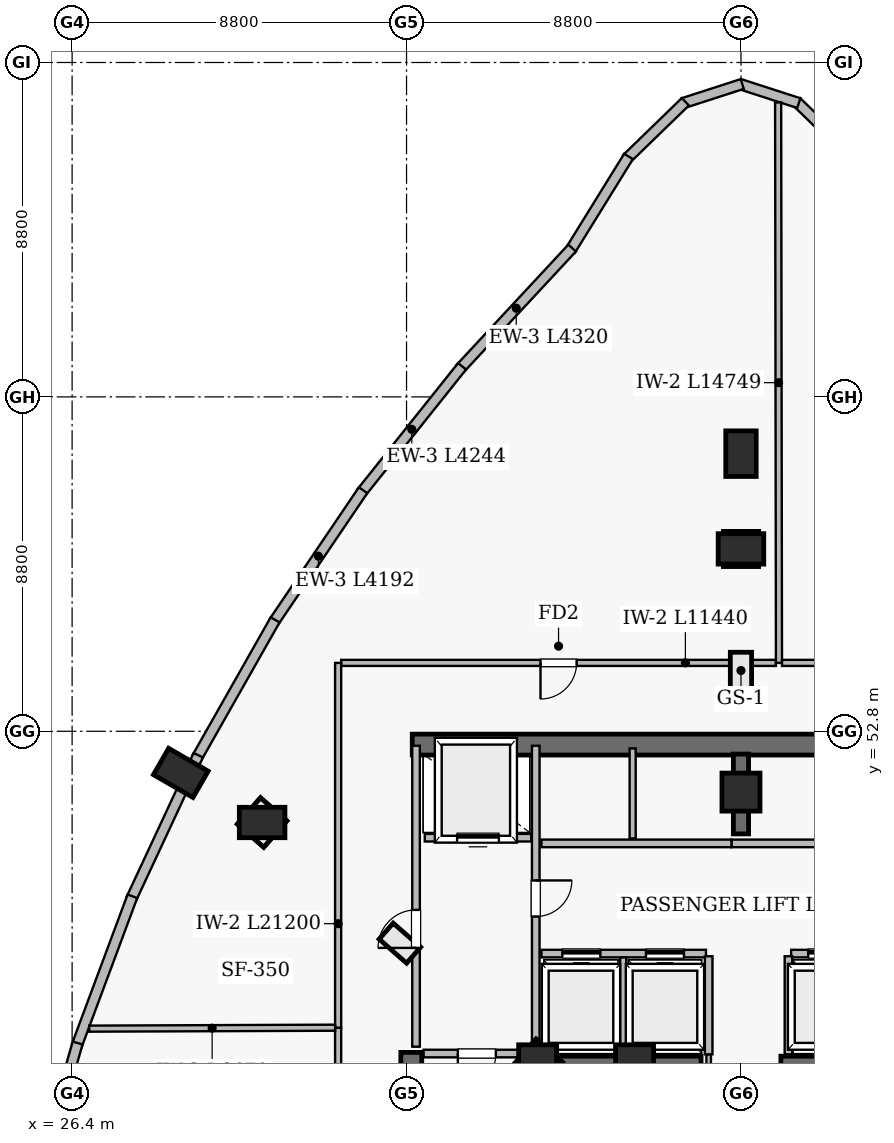
"""IFC4 building model, lengths in metres.
Left out: names, types, materials, properties, quantities, classifications, styles, units other than length and angle.
Written with IfcOpenShell. Run it as: python <this file> out.ifc"""

import sys

from ifc_helpers import new_model, si_unit, direction, frame, frame_2d, origin, origin_2d, place, context, subcontext, project, spatial, rectangle, extrude, element, fill, save


model = new_model("IFC4")
c1 = context("Model", 3, precision=1e-05, world=origin(), true_north=direction((0.0, 1.0)))
c2 = subcontext(c1, "Body", "Model", "MODEL_VIEW")
j1 = project(units=[si_unit("LENGTHUNIT", "METRE"), si_unit("PLANEANGLEUNIT", "RADIAN")], contexts=[c1])
p1 = place(None, origin())
s1 = spatial("IfcSite", under=j1, at=p1, CompositionType="ELEMENT")
p2 = place(p1, origin())
s2 = spatial("IfcBuilding", under=s1, at=p2, CompositionType="ELEMENT")
p3 = place(p2, frame((0.0, 0.0, 184.4)))
s3 = spatial("IfcBuildingStorey", under=s2, at=p3, CompositionType="ELEMENT", Elevation=184.4)
p4 = place(p3, frame((35.35, 52.45, 0.0), z_axis=(0.0, 0.0, 1.0), x_axis=(1.0, 0.0, 0.0)))
e1 = element("IfcWall", 1, at=p4, inside=s3, PredefinedType="SHEAR", context=c2, shape_type="SweptSolid", body=[
    extrude(rectangle(XDim=17.3, YDim=0.55, at=frame_2d((8.65, 0.0))), origin(), (0.0, 0.0, 1.0), 5.1),
])
p5 = place(p3, frame((35.325, 35.05, 0.0), z_axis=(0.0, 0.0, 1.0), x_axis=(0.0, 1.0, 0.0)))
e2 = element("IfcWall", 2, at=p5, inside=s3, PredefinedType="SHEAR", context=c2, shape_type="SweptSolid", body=[
    extrude(rectangle(XDim=9.3, YDim=0.55, at=frame_2d((4.65, 0.0))), origin(), (0.0, 0.0, 1.0), 5.1),
])
p6 = place(p3, frame((38.725, 35.4, 0.0), z_axis=(0.0, 0.0, 1.0), x_axis=(0.0, 1.0, 0.0)))
e3 = element("IfcWall", 3, at=p6, inside=s3, PredefinedType="SHEAR", context=c2, shape_type="SweptSolid", body=[
    extrude(rectangle(XDim=8.95, YDim=0.55, at=frame_2d((4.475, 0.0))), origin(), (0.0, 0.0, 1.0), 5.1),
])
p7 = place(p3, frame((44.0, 50.1, 0.0), z_axis=(0.0, 0.0, 1.0), x_axis=(0.0, 1.0, 0.0)))
e4 = element("IfcWall", 4, at=p7, inside=s3, PredefinedType="SHEAR", context=c2, shape_type="SweptSolid", body=[
    extrude(rectangle(XDim=2.1, YDim=0.4, at=frame_2d((1.05, 0.0))), origin(), (0.0, 0.0, 1.0), 5.1),
])
for number, where, z_axis, x_axis in (
    (5, (38.75, 44.05, 0.0), (0.0, 0.0, 1.0), (1.0, 0.0, 0.0)),
    (6, (45.05, 44.05, 0.0), (0.0, 0.0, 1.0), (1.0, 0.0, 0.0)),
):
    element("IfcWall", number, at=place(p3, frame(where, z_axis=z_axis, x_axis=x_axis)), inside=s3, PredefinedType="SHEAR", context=c2, shape_type="SweptSolid", body=[
        extrude(rectangle(XDim=4.2, YDim=0.4, at=frame_2d((2.1, 0.0))), origin(), (0.0, 0.0, 1.0), 5.1),
    ])
for number, where, z_axis, x_axis in (
    (7, (38.65, 44.05, 0.0), (0.0, 0.0, 1.0), (1.0, 0.0, 0.0)),
    (8, (44.0, 51.2, 0.0), (0.0, 0.0, 1.0), (1.0, 0.0, 0.0)),
    (9, (41.2, 44.05, 0.0), (0.0, 0.0, 1.0), (1.0, 0.0, 0.0)),
):
    element("IfcColumn", number, at=place(p3, frame(where, z_axis=z_axis, x_axis=x_axis)), inside=s3, PredefinedType="COLUMN", context=c2, shape_type="SweptSolid", body=[
        extrude(rectangle(XDim=1.0, YDim=1.0, at=origin_2d()), origin(), (0.0, 0.0, 1.0), 5.4),
    ])
for number, where, z_axis, x_axis in (
    (10, (44.0, 57.6, 0.0), (0.0, 0.0, 1.0), (1.0, 0.0, 0.0)),
    (11, (31.4, 50.4, 0.0), (0.0, 0.0, 1.0), (1.0, 0.0, 0.0)),
    (12, (44.0, 60.106, 0.0), (0.0, 0.0, 1.0), (0.0, 1.0, 0.0)),
    (13, (29.26, 51.705, 0.0), (0.0, 0.0, 1.0), (-0.866, 0.5, 0.0)),
):
    element("IfcColumn", number, at=place(p3, frame(where, z_axis=z_axis, x_axis=x_axis)), inside=s3, PredefinedType="COLUMN", context=c2, shape_type="SweptSolid", body=[
        extrude(rectangle(XDim=1.2, YDim=0.8, at=origin_2d()), origin(), (0.0, 0.0, 1.0), 5.4),
    ])
p8 = place(p3, frame((47.003, 67.873, 0.0), z_axis=(0.0, 0.0, 1.0), x_axis=(-0.717784851278, 0.696264969157, 0.0)))
e14 = element("IfcWall", 14, at=p8, inside=s3, PredefinedType="SOLIDWALL", context=c2, shape_type="SweptSolid", body=[
    extrude(rectangle(XDim=2.144, YDim=0.27, at=frame_2d((1.072, 0.0))), origin(), (0.0, 0.0, 1.0), 5.1),
])
for number, where, z_axis, x_axis in (
    (15, (45.522, 69.331, 0.0), (0.0, 0.0, 1.0), (-0.951, 0.308, 0.0)),
    (16, (44.033, 69.834, 0.0), (0.0, 0.0, 1.0), (-0.951, -0.308, 0.0)),
):
    element("IfcWall", number, at=place(p3, frame(where, z_axis=z_axis, x_axis=x_axis)), inside=s3, PredefinedType="SOLIDWALL", context=c2, shape_type="SweptSolid", body=[
        extrude(rectangle(XDim=1.635, YDim=0.27, at=frame_2d((0.817, 0.0))), origin(), (0.0, 0.0, 1.0), 5.1),
    ])
p9 = place(p3, frame((42.536, 69.366, 0.0), z_axis=(0.0, 0.0, 1.0), x_axis=(-0.717784851278, -0.696264969157, 0.0)))
e17 = element("IfcWall", 17, at=p9, inside=s3, PredefinedType="SOLIDWALL", context=c2, shape_type="SweptSolid", body=[
    extrude(rectangle(XDim=2.144, YDim=0.27, at=frame_2d((1.072, 0.0))), origin(), (0.0, 0.0, 1.0), 5.1),
])
p10 = place(p3, frame((41.041, 67.927, 0.0), z_axis=(0.0, 0.0, 1.0), x_axis=(-0.526073462403, -0.850439129012, 0.0)))
e18 = element("IfcWall", 18, at=p10, inside=s3, PredefinedType="SOLIDWALL", context=c2, shape_type="SweptSolid", body=[
    extrude(rectangle(XDim=2.9, YDim=0.27, at=frame_2d((1.45, 0.0))), origin(), (0.0, 0.0, 1.0), 5.1),
])
p11 = place(p3, frame((39.557, 65.516, 0.0), z_axis=(0.0, 0.0, 1.0), x_axis=(-0.68089748503, -0.732378737321, 0.0)))
e19 = element("IfcWall", 19, at=p11, inside=s3, PredefinedType="SOLIDWALL", context=c2, shape_type="SweptSolid", body=[
    extrude(rectangle(XDim=4.32, YDim=0.27, at=frame_2d((2.16, 0.0))), origin(), (0.0, 0.0, 1.0), 5.1),
])
p12 = place(p3, frame((36.661, 62.405, 0.0), z_axis=(0.0, 0.0, 1.0), x_axis=(-0.623600005041, -0.781743585655, 0.0)))
e20 = element("IfcWall", 20, at=p12, inside=s3, PredefinedType="SOLIDWALL", context=c2, shape_type="SweptSolid", body=[
    extrude(rectangle(XDim=4.244, YDim=0.27, at=frame_2d((2.122, 0.0))), origin(), (0.0, 0.0, 1.0), 5.1),
])
p13 = place(p3, frame((34.056, 59.144, 0.0), z_axis=(0.0, 0.0, 1.0), x_axis=(-0.560853295684, -0.827915201406, 0.0)))
e21 = element("IfcWall", 21, at=p13, inside=s3, PredefinedType="SOLIDWALL", context=c2, shape_type="SweptSolid", body=[
    extrude(rectangle(XDim=4.192, YDim=0.27, at=frame_2d((2.096, 0.0))), origin(), (0.0, 0.0, 1.0), 5.1),
])
p14 = place(p3, frame((31.742, 55.732, 0.0), z_axis=(0.0, 0.0, 1.0), x_axis=(-0.49336591454, -0.869821863585, 0.0)))
e22 = element("IfcWall", 22, at=p14, inside=s3, PredefinedType="SOLIDWALL", context=c2, shape_type="SweptSolid", body=[
    extrude(rectangle(XDim=4.166, YDim=0.27, at=frame_2d((2.083, 0.0))), origin(), (0.0, 0.0, 1.0), 4.588),
])
p15 = place(p3, frame((29.719, 52.171, 0.0), z_axis=(0.0, 0.0, 1.0), x_axis=(-0.422336806268, -0.906438978681, 0.0)))
e23 = element("IfcWall", 23, at=p15, inside=s3, PredefinedType="SOLIDWALL", context=c2, shape_type="SweptSolid", body=[
    extrude(rectangle(XDim=4.166, YDim=0.27, at=frame_2d((2.083, 0.0))), origin(), (0.0, 0.0, 1.0), 4.588),
])
p16 = place(p3, frame((27.986, 48.459, 0.0), z_axis=(0.0, 0.0, 1.0), x_axis=(-0.349022784807, -0.937114238333, 0.0)))
e24 = element("IfcWall", 24, at=p16, inside=s3, PredefinedType="SOLIDWALL", context=c2, shape_type="SweptSolid", body=[
    extrude(rectangle(XDim=4.192, YDim=0.27, at=frame_2d((2.096, 0.0))), origin(), (0.0, 0.0, 1.0), 5.1),
])
p17 = place(p3, frame((26.545, 44.597, 0.0), z_axis=(0.0, 0.0, 1.0), x_axis=(-0.274964238992, -0.961454454083, 0.0)))
e25 = element("IfcWall", 25, at=p17, inside=s3, PredefinedType="SOLIDWALL", context=c2, shape_type="SweptSolid", body=[
    extrude(rectangle(XDim=4.244, YDim=0.27, at=frame_2d((2.122, 0.0))), origin(), (0.0, 0.0, 1.0), 5.1),
])
p18 = place(p3, frame((33.4, 45.0, 0.0), z_axis=(0.0, 0.0, 1.0), x_axis=(0.0, -1.0, 0.0)))
e26 = element("IfcWall", 26, at=p18, inside=s3, PredefinedType="SOLIDWALL", context=c2, shape_type="SweptSolid", body=[
    extrude(rectangle(XDim=11.6, YDim=0.16, at=frame_2d((5.8, 0.0))), origin(), (0.0, 0.0, 1.0), 4.188),
])
p19 = place(p18, frame((4.605, 0.0, 0.0)))
e27 = element("IfcOpeningElement", 27, at=p19, cuts=e26, PredefinedType="OPENING", context=c2, shape_type="SweptSolid", body=[
    extrude(rectangle(XDim=0.95, YDim=2.15, at=frame_2d((0.475, 1.075))), frame((0.0, 0.09, 0.0), z_axis=(0.0, -1.0, 0.0), x_axis=(1.0, 0.0, 0.0)), (0.0, 0.0, 1.0), 0.18),
])
p20 = place(p3, frame((44.92, 54.6, 0.0), z_axis=(0.0, 0.0, 1.0), x_axis=(-1.0, 0.0, 0.0)))
e28 = element("IfcWall", 28, at=p20, inside=s3, PredefinedType="SOLIDWALL", context=c2, shape_type="SweptSolid", body=[
    extrude(rectangle(XDim=11.44, YDim=0.16, at=frame_2d((5.72, 0.0))), origin(), (0.0, 0.0, 1.0), 4.188),
])
p21 = place(p20, frame((5.245, 0.0, 0.0)))
e29 = element("IfcOpeningElement", 29, at=p21, cuts=e28, PredefinedType="OPENING", context=c2, shape_type="SweptSolid", body=[
    extrude(rectangle(XDim=0.95, YDim=2.15, at=frame_2d((0.475, 1.075))), frame((0.0, 0.09, 0.0), z_axis=(0.0, -1.0, 0.0), x_axis=(1.0, 0.0, 0.0)), (0.0, 0.0, 1.0), 0.18),
])
p22 = place(p3, frame((43.15, 35.6, 0.0), z_axis=(0.0, 0.0, 1.0), x_axis=(0.0, 1.0, 0.0)))
e30 = element("IfcWall", 30, at=p22, inside=s3, PredefinedType="PARTITIONING", context=c2, shape_type="SweptSolid", body=[
    extrude(rectangle(XDim=8.7, YDim=0.12, at=frame_2d((4.35, 0.0))), origin(), (0.0, 0.0, 1.0), 5.1),
])
p23 = place(p22, frame((1.11, 0.0, 0.0)))
e31 = element("IfcOpeningElement", 31, at=p23, cuts=e30, PredefinedType="OPENING", context=c2, shape_type="SweptSolid", body=[
    extrude(rectangle(XDim=0.88, YDim=2.1, at=frame_2d((0.44, 1.05))), frame((0.0, 0.07, 0.0), z_axis=(0.0, -1.0, 0.0), x_axis=(1.0, 0.0, 0.0)), (0.0, 0.0, 1.0), 0.14),
])
p24 = place(p22, frame((5.35, 0.0, 0.0)))
e32 = element("IfcOpeningElement", 32, at=p24, cuts=e30, PredefinedType="OPENING", context=c2, shape_type="SweptSolid", body=[
    extrude(rectangle(XDim=0.9, YDim=2.1, at=frame_2d((0.45, 1.05))), frame((0.0, 0.07, 0.0), z_axis=(0.0, -1.0, 0.0), x_axis=(1.0, 0.0, 0.0)), (0.0, 0.0, 1.0), 0.14),
])
p25 = place(p3, frame((35.45, 44.5, 0.0), z_axis=(0.0, 0.0, 1.0), x_axis=(0.0, 1.0, 0.0)))
e33 = element("IfcWall", 33, at=p25, inside=s3, PredefinedType="SOLIDWALL", context=c2, shape_type="SweptSolid", body=[
    extrude(rectangle(XDim=7.92, YDim=0.2, at=frame_2d((3.96, 0.0))), origin(), (0.0, 0.0, 1.0), 5.1),
])
p26 = place(p25, frame((2.6, 0.0, 0.0)))
e34 = element("IfcOpeningElement", 34, at=p26, cuts=e33, PredefinedType="OPENING", context=c2, shape_type="SweptSolid", body=[
    extrude(rectangle(XDim=1.0, YDim=2.15, at=frame_2d((0.5, 1.075))), frame((0.0, 0.11, 0.0), z_axis=(0.0, -1.0, 0.0), x_axis=(1.0, 0.0, 0.0)), (0.0, 0.0, 1.0), 0.22),
])
p27 = place(p3, frame((38.6, 44.5, 0.0), z_axis=(0.0, 0.0, 1.0), x_axis=(0.0, 1.0, 0.0)))
e35 = element("IfcWall", 35, at=p27, inside=s3, PredefinedType="SOLIDWALL", context=c2, shape_type="SweptSolid", body=[
    extrude(rectangle(XDim=7.92, YDim=0.2, at=frame_2d((3.96, 0.0))), origin(), (0.0, 0.0, 1.0), 5.1),
])
p28 = place(p27, frame((3.425, 0.0, 0.0)))
e36 = element("IfcOpeningElement", 36, at=p28, cuts=e35, PredefinedType="OPENING", context=c2, shape_type="SweptSolid", body=[
    extrude(rectangle(XDim=0.95, YDim=2.15, at=frame_2d((0.475, 1.075))), frame((0.0, 0.11, 0.0), z_axis=(0.0, -1.0, 0.0), x_axis=(1.0, 0.0, 0.0)), (0.0, 0.0, 1.0), 0.22),
])
p29 = place(p3, frame((43.75, 49.85, 0.0), z_axis=(0.0, 0.0, 1.0), x_axis=(1.0, 0.0, 0.0)))
e37 = element("IfcWall", 37, at=p29, inside=s3, PredefinedType="SOLIDWALL", context=c2, shape_type="SweptSolid", body=[
    extrude(rectangle(XDim=5.5, YDim=0.2, at=frame_2d((2.75, 0.0))), origin(), (0.0, 0.0, 1.0), 4.188),
])
p30 = place(p29, frame((3.5, 0.0, 0.0)))
e38 = element("IfcOpeningElement", 38, at=p30, cuts=e37, PredefinedType="OPENING", context=c2, shape_type="SweptSolid", body=[
    extrude(rectangle(XDim=1.1, YDim=2.15, at=frame_2d((0.55, 1.075))), frame((0.0, 0.11, 0.0), z_axis=(0.0, -1.0, 0.0), x_axis=(1.0, 0.0, 0.0)), (0.0, 0.0, 1.0), 0.22),
])
p31 = place(p3, frame((38.75, 46.95, 0.0), z_axis=(0.0, 0.0, 1.0), x_axis=(1.0, 0.0, 0.0)))
e39 = element("IfcWall", 39, at=p31, inside=s3, PredefinedType="SOLIDWALL", context=c2, shape_type="SweptSolid", body=[
    extrude(rectangle(XDim=4.33, YDim=0.2, at=frame_2d((2.165, 0.0))), origin(), (0.0, 0.0, 1.0), 5.1),
])
p32 = place(p31, frame((0.55, 0.0, 0.0)))
e40 = element("IfcOpeningElement", 40, at=p32, cuts=e39, PredefinedType="OPENING", context=c2, shape_type="SweptSolid", body=[
    extrude(rectangle(XDim=1.0, YDim=2.15, at=frame_2d((0.5, 1.075))), frame((0.0, 0.11, 0.0), z_axis=(0.0, -1.0, 0.0), x_axis=(1.0, 0.0, 0.0)), (0.0, 0.0, 1.0), 0.22),
])
p33 = place(p31, frame((2.75, 0.0, 0.0)))
e41 = element("IfcOpeningElement", 41, at=p33, cuts=e39, PredefinedType="OPENING", context=c2, shape_type="SweptSolid", body=[
    extrude(rectangle(XDim=1.0, YDim=2.15, at=frame_2d((0.5, 1.075))), frame((0.0, 0.11, 0.0), z_axis=(0.0, -1.0, 0.0), x_axis=(1.0, 0.0, 0.0)), (0.0, 0.0, 1.0), 0.22),
])
p34 = place(p3, frame((45.32, 46.95, 0.0), z_axis=(0.0, 0.0, 1.0), x_axis=(1.0, 0.0, 0.0)))
e42 = element("IfcWall", 42, at=p34, inside=s3, PredefinedType="SOLIDWALL", context=c2, shape_type="SweptSolid", body=[
    extrude(rectangle(XDim=3.93, YDim=0.2, at=frame_2d((1.965, 0.0))), origin(), (0.0, 0.0, 1.0), 4.188),
])
p35 = place(p34, frame((0.45, 0.0, 0.0)))
e43 = element("IfcOpeningElement", 43, at=p35, cuts=e42, PredefinedType="OPENING", context=c2, shape_type="SweptSolid", body=[
    extrude(rectangle(XDim=1.0, YDim=2.15, at=frame_2d((0.5, 1.075))), frame((0.0, 0.11, 0.0), z_axis=(0.0, -1.0, 0.0), x_axis=(1.0, 0.0, 0.0)), (0.0, 0.0, 1.0), 0.22),
])
p36 = place(p34, frame((2.45, 0.0, 0.0)))
e44 = element("IfcOpeningElement", 44, at=p36, cuts=e42, PredefinedType="OPENING", context=c2, shape_type="SweptSolid", body=[
    extrude(rectangle(XDim=1.0, YDim=2.15, at=frame_2d((0.5, 1.075))), frame((0.0, 0.11, 0.0), z_axis=(0.0, -1.0, 0.0), x_axis=(1.0, 0.0, 0.0)), (0.0, 0.0, 1.0), 0.22),
])
p37 = place(p3, frame((35.65, 44.32, 0.0), z_axis=(0.0, 0.0, 1.0), x_axis=(1.0, 0.0, 0.0)))
e45 = element("IfcWall", 45, at=p37, inside=s3, PredefinedType="SOLIDWALL", context=c2, shape_type="SweptSolid", body=[
    extrude(rectangle(XDim=2.8, YDim=0.2, at=frame_2d((1.4, 0.0))), origin(), (0.0, 0.0, 1.0), 5.1),
])
p38 = place(p37, frame((0.9, 0.0, 0.0)))
e46 = element("IfcOpeningElement", 46, at=p38, cuts=e45, PredefinedType="OPENING", context=c2, shape_type="SweptSolid", body=[
    extrude(rectangle(XDim=1.0, YDim=2.15, at=frame_2d((0.5, 1.075))), frame((0.0, 0.11, 0.0), z_axis=(0.0, -1.0, 0.0), x_axis=(1.0, 0.0, 0.0)), (0.0, 0.0, 1.0), 0.22),
])
p39 = place(p3, frame((35.68, 50.0, 0.0), z_axis=(0.0, 0.0, 1.0), x_axis=(1.0, 0.0, 0.0)))
e47 = element("IfcWall", 47, at=p39, inside=s3, PredefinedType="SOLIDWALL", context=c2, shape_type="SweptSolid", body=[
    extrude(rectangle(XDim=2.8, YDim=0.2, at=frame_2d((1.4, 0.0))), origin(), (0.0, 0.0, 1.0), 5.1),
])
p40 = place(p39, frame((0.85, 0.0, 0.0)))
e48 = element("IfcOpeningElement", 48, at=p40, cuts=e47, PredefinedType="OPENING", context=c2, shape_type="SweptSolid", body=[
    extrude(rectangle(XDim=1.1, YDim=2.15, at=frame_2d((0.55, 1.075))), frame((0.0, 0.11, 0.0), z_axis=(0.0, -1.0, 0.0), x_axis=(1.0, 0.0, 0.0)), (0.0, 0.0, 1.0), 0.22),
])
p41 = place(p3, frame((45.0, 54.6, 0.0), z_axis=(0.0, 0.0, 1.0), x_axis=(-0.001489768591, 0.999998890294, 0.0)))
e49 = element("IfcWall", 49, at=p41, inside=s3, PredefinedType="SOLIDWALL", context=c2, shape_type="SweptSolid", body=[
    extrude(rectangle(XDim=14.749, YDim=0.16, at=frame_2d((7.375, 0.0))), origin(), (0.0, 0.0, 1.0), 4.188),
])
p42 = place(p3, frame((33.4, 54.6, 0.0), z_axis=(0.0, 0.0, 1.0), x_axis=(0.0, -1.0, 0.0)))
e50 = element("IfcWall", 50, at=p42, inside=s3, PredefinedType="SOLIDWALL", context=c2, shape_type="SweptSolid", body=[
    extrude(rectangle(XDim=9.6, YDim=0.16, at=frame_2d((4.8, 0.0))), origin(), (0.0, 0.0, 1.0), 4.188),
])
p43 = place(p3, frame((52.47, 54.6, 0.0), z_axis=(0.0, 0.0, 1.0), x_axis=(-1.0, 0.0, 0.0)))
e51 = element("IfcWall", 51, at=p43, inside=s3, PredefinedType="SOLIDWALL", context=c2, shape_type="SweptSolid", body=[
    extrude(rectangle(XDim=7.39, YDim=0.16, at=frame_2d((3.695, 0.0))), origin(), (0.0, 0.0, 1.0), 4.188),
])
p44 = place(p3, frame((33.32, 45.0, 0.0), z_axis=(0.0, 0.0, 1.0), x_axis=(-0.999992595258, -0.003848302008, 0.0)))
e52 = element("IfcWall", 52, at=p44, inside=s3, PredefinedType="SOLIDWALL", context=c2, shape_type="SweptSolid", body=[
    extrude(rectangle(XDim=6.471, YDim=0.16, at=frame_2d((3.235, 0.0))), origin(), (0.0, 0.0, 1.0), 4.188),
])
p45 = place(p3, frame((38.75, 49.85, 0.0), z_axis=(0.0, 0.0, 1.0), x_axis=(1.0, 0.0, 0.0)))
e53 = element("IfcWall", 53, at=p45, inside=s3, PredefinedType="SOLIDWALL", context=c2, shape_type="SweptSolid", body=[
    extrude(rectangle(XDim=5.0, YDim=0.2, at=frame_2d((2.5, 0.0))), origin(), (0.0, 0.0, 1.0), 5.1),
])
for number, where, z_axis, x_axis in (
    (54, (43.15, 44.3, 0.0), (0.0, 0.0, 1.0), (0.0, 1.0, 0.0)),
    (55, (45.25, 44.3, 0.0), (0.0, 0.0, 1.0), (0.0, 1.0, 0.0)),
):
    element("IfcWall", number, at=place(p3, frame(where, z_axis=z_axis, x_axis=x_axis)), inside=s3, PredefinedType="SOLIDWALL", context=c2, shape_type="SweptSolid", body=[
        extrude(rectangle(XDim=2.58, YDim=0.2, at=frame_2d((1.29, 0.0))), origin(), (0.0, 0.0, 1.0), 5.1),
    ])
p46 = place(p3, frame((40.9, 44.3, 0.0), z_axis=(0.0, 0.0, 1.0), x_axis=(0.0, 1.0, 0.0)))
e56 = element("IfcWall", 56, at=p46, inside=s3, PredefinedType="SOLIDWALL", context=c2, shape_type="SweptSolid", body=[
    extrude(rectangle(XDim=2.55, YDim=0.16, at=frame_2d((1.275, 0.0))), origin(), (0.0, 0.0, 1.0), 5.1),
])
p47 = place(p3, frame((41.15, 49.98, 0.0), z_axis=(0.0, 0.0, 1.0), x_axis=(0.0, 1.0, 0.0)))
e57 = element("IfcWall", 57, at=p47, inside=s3, PredefinedType="SOLIDWALL", context=c2, shape_type="SweptSolid", body=[
    extrude(rectangle(XDim=2.37, YDim=0.16, at=frame_2d((1.185, 0.0))), origin(), (0.0, 0.0, 1.0), 5.1),
])
p48 = place(p38, frame((1.0, 0.0, 0.0), z_axis=(0.0, 0.0, 1.0), x_axis=(-1.0, 0.0, 0.0)))
e58 = element("IfcDoor", 58, at=p48, inside=s3, OperationType="SINGLE_SWING_LEFT", PredefinedType="DOOR", context=c2, shape_type="SweptSolid", body=[
    extrude(rectangle(XDim=1.0, YDim=2.15, at=frame_2d((0.5, 1.075))), frame((0.0, 0.025, 0.0), z_axis=(0.0, -1.0, 0.0), x_axis=(1.0, 0.0, 0.0)), (0.0, 0.0, 1.0), 0.05),
])
fill(e46, e58)
p49 = place(p26, origin())
e59 = element("IfcDoor", 59, at=p49, inside=s3, OperationType="SINGLE_SWING_LEFT", PredefinedType="DOOR", context=c2, shape_type="SweptSolid", body=[
    extrude(rectangle(XDim=1.0, YDim=2.15, at=frame_2d((0.5, 1.075))), frame((0.0, 0.025, 0.0), z_axis=(0.0, -1.0, 0.0), x_axis=(1.0, 0.0, 0.0)), (0.0, 0.0, 1.0), 0.05),
])
fill(e34, e59)
p50 = place(p28, frame((0.95, 0.0, 0.0), z_axis=(0.0, 0.0, 1.0), x_axis=(-1.0, 0.0, 0.0)))
e60 = element("IfcDoor", 60, at=p50, inside=s3, OperationType="SINGLE_SWING_RIGHT", PredefinedType="DOOR", context=c2, shape_type="SweptSolid", body=[
    extrude(rectangle(XDim=0.95, YDim=2.15, at=frame_2d((0.475, 1.075))), frame((0.0, 0.025, 0.0), z_axis=(0.0, -1.0, 0.0), x_axis=(1.0, 0.0, 0.0)), (0.0, 0.0, 1.0), 0.05),
])
fill(e36, e60)
p51 = place(p40, origin())
e61 = element("IfcDoor", 61, at=p51, inside=s3, OperationType="SLIDING_TO_LEFT", PredefinedType="DOOR", context=c2, shape_type="SweptSolid", body=[
    extrude(rectangle(XDim=1.1, YDim=2.15, at=frame_2d((0.55, 1.075))), frame((0.0, 0.025, 0.0), z_axis=(0.0, -1.0, 0.0), x_axis=(1.0, 0.0, 0.0)), (0.0, 0.0, 1.0), 0.05),
])
fill(e48, e61)
p52 = place(p32, origin())
e62 = element("IfcDoor", 62, at=p52, inside=s3, OperationType="SLIDING_TO_LEFT", PredefinedType="DOOR", context=c2, shape_type="SweptSolid", body=[
    extrude(rectangle(XDim=1.0, YDim=2.15, at=frame_2d((0.5, 1.075))), frame((0.0, 0.025, 0.0), z_axis=(0.0, -1.0, 0.0), x_axis=(1.0, 0.0, 0.0)), (0.0, 0.0, 1.0), 0.05),
])
fill(e40, e62)
p53 = place(p33, origin())
e63 = element("IfcDoor", 63, at=p53, inside=s3, OperationType="SLIDING_TO_LEFT", PredefinedType="DOOR", context=c2, shape_type="SweptSolid", body=[
    extrude(rectangle(XDim=1.0, YDim=2.15, at=frame_2d((0.5, 1.075))), frame((0.0, 0.025, 0.0), z_axis=(0.0, -1.0, 0.0), x_axis=(1.0, 0.0, 0.0)), (0.0, 0.0, 1.0), 0.05),
])
fill(e41, e63)
p54 = place(p35, origin())
e64 = element("IfcDoor", 64, at=p54, inside=s3, OperationType="SLIDING_TO_LEFT", PredefinedType="DOOR", context=c2, shape_type="SweptSolid", body=[
    extrude(rectangle(XDim=1.0, YDim=2.15, at=frame_2d((0.5, 1.075))), frame((0.0, 0.025, 0.0), z_axis=(0.0, -1.0, 0.0), x_axis=(1.0, 0.0, 0.0)), (0.0, 0.0, 1.0), 0.05),
])
fill(e43, e64)
p55 = place(p21, origin())
e65 = element("IfcDoor", 65, at=p55, inside=s3, OperationType="SINGLE_SWING_RIGHT", PredefinedType="DOOR", context=c2, shape_type="SweptSolid", body=[
    extrude(rectangle(XDim=0.95, YDim=2.15, at=frame_2d((0.475, 1.075))), frame((0.0, 0.025, 0.0), z_axis=(0.0, -1.0, 0.0), x_axis=(1.0, 0.0, 0.0)), (0.0, 0.0, 1.0), 0.05),
])
fill(e29, e65)
save(model, sys.argv[1])
